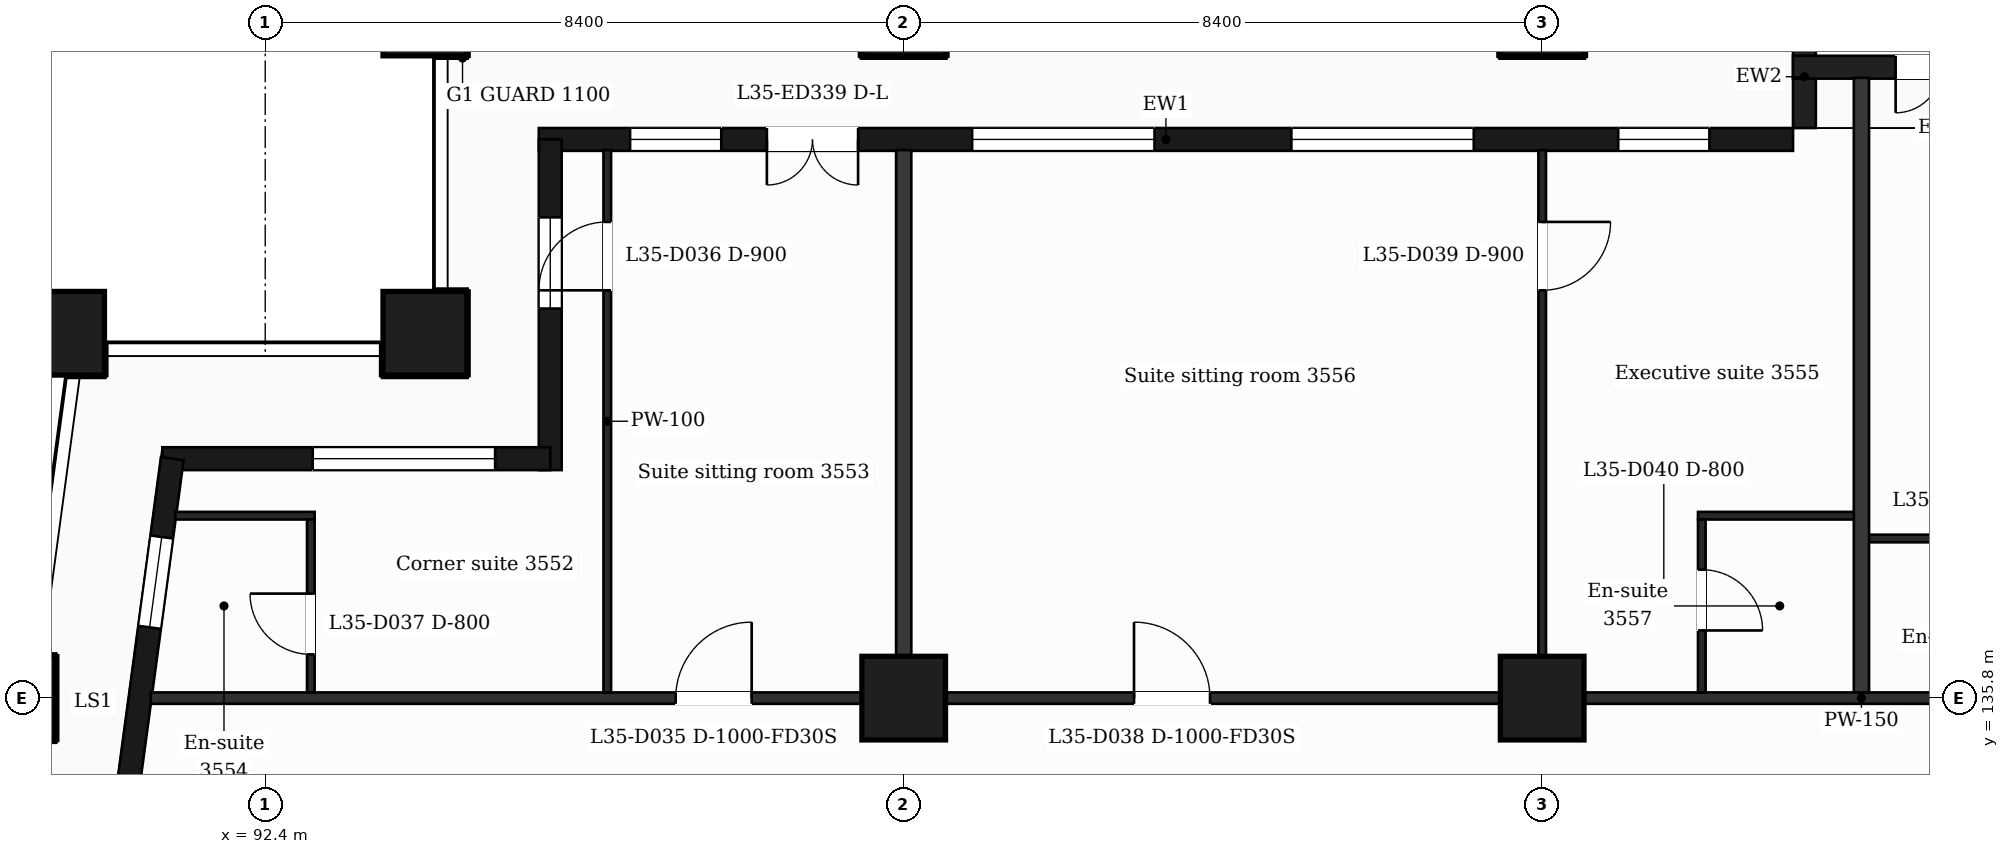
"""IFC4 building model, lengths in metres.
Left out: names, types, materials, properties, quantities, classifications, styles, units other than length and angle.
Written with IfcOpenShell. Run it as: python <this file> out.ifc"""

import sys

from ifc_helpers import new_model, si_unit, direction, frame, frame_2d, origin, origin_2d, place, context, subcontext, project, spatial, rectangle, extrude, element, fill, save


model = new_model("IFC4")
c1 = context("Model", 3, precision=1e-05, world=origin(), true_north=direction((0.0, 1.0)))
c2 = subcontext(c1, "Body", "Model", "MODEL_VIEW")
j1 = project(units=[si_unit("LENGTHUNIT", "METRE"), si_unit("PLANEANGLEUNIT", "RADIAN")], contexts=[c1])
p1 = place(None, origin())
s1 = spatial("IfcSite", under=j1, at=p1, CompositionType="ELEMENT")
p2 = place(p1, origin())
s2 = spatial("IfcBuilding", under=s1, at=p2, CompositionType="ELEMENT")
p3 = place(p2, frame((0.0, 0.0, 151.5)))
s3 = spatial("IfcBuildingStorey", under=s2, at=p3, CompositionType="ELEMENT", Elevation=151.5)
for number, where, z_axis, x_axis in (
    (1, (94.5, 140.6, 0.0), (0.0, 0.0, 1.0), (1.0, 0.0, 0.0)),
    (2, (89.735, 140.6, 0.0), (0.0, 0.0, 1.0), (1.0, 0.0, 0.0)),
    (3, (100.8, 135.8, 0.0), (0.0, 0.0, 1.0), (1.0, 0.0, 0.0)),
    (4, (109.2, 135.8, 0.0), (0.0, 0.0, 1.0), (1.0, 0.0, 0.0)),
    (5, (89.088, 135.8, 0.0), (0.0, 0.0, 1.0), (1.0, 0.0, 0.0)),
    (6, (100.8, 144.8, 0.0), (0.0, 0.0, 1.0), (1.0, 0.0, 0.0)),
    (7, (109.2, 144.8, 0.0), (0.0, 0.0, 1.0), (1.0, 0.0, 0.0)),
    (8, (94.5, 144.8, 0.0), (0.0, 0.0, 1.0), (1.0, 0.0, 0.0)),
):
    element("IfcColumn", number, at=place(p3, frame(where, z_axis=z_axis, x_axis=x_axis)), inside=s3, PredefinedType="COLUMN", context=c2, shape_type="SweptSolid", body=[
        extrude(rectangle(XDim=1.1, YDim=1.1, at=origin_2d()), origin(), (0.0, 0.0, 1.0), 3.7),
    ])
p4 = place(p3, frame((112.5, 143.15, 0.0), z_axis=(0.0, 0.0, 1.0), x_axis=(-1.0, 0.0, 0.0)))
e9 = element("IfcWall", 9, at=p4, inside=s3, PredefinedType="SOLIDWALL", context=c2, shape_type="SweptSolid", body=[
    extrude(rectangle(XDim=16.5, YDim=0.3, at=frame_2d((8.25, 0.0))), origin(), (0.0, 0.0, 1.0), 3.38),
])
p5 = place(p4, frame((1.1, 0.0, 0.9)))
e10 = element("IfcOpeningElement", 10, at=p5, cuts=e9, PredefinedType="OPENING", context=c2, shape_type="SweptSolid", body=[
    extrude(rectangle(XDim=1.2, YDim=2.1, at=frame_2d((0.6, 1.05))), frame((0.0, 0.16, 0.0), z_axis=(0.0, -1.0, 0.0), x_axis=(1.0, 0.0, 0.0)), (0.0, 0.0, 1.0), 0.32),
])
p6 = place(p4, frame((4.2, 0.0, 0.9)))
e11 = element("IfcOpeningElement", 11, at=p6, cuts=e9, PredefinedType="OPENING", context=c2, shape_type="SweptSolid", body=[
    extrude(rectangle(XDim=2.4, YDim=2.1, at=frame_2d((1.2, 1.05))), frame((0.0, 0.16, 0.0), z_axis=(0.0, -1.0, 0.0), x_axis=(1.0, 0.0, 0.0)), (0.0, 0.0, 1.0), 0.32),
])
p7 = place(p4, frame((8.4, 0.0, 0.9)))
e12 = element("IfcOpeningElement", 12, at=p7, cuts=e9, PredefinedType="OPENING", context=c2, shape_type="SweptSolid", body=[
    extrude(rectangle(XDim=2.4, YDim=2.1, at=frame_2d((1.2, 1.05))), frame((0.0, 0.16, 0.0), z_axis=(0.0, -1.0, 0.0), x_axis=(1.0, 0.0, 0.0)), (0.0, 0.0, 1.0), 0.32),
])
p8 = place(p4, frame((12.3, 0.0, 0.0)))
e13 = element("IfcOpeningElement", 13, at=p8, cuts=e9, PredefinedType="OPENING", context=c2, shape_type="SweptSolid", body=[
    extrude(rectangle(XDim=1.2, YDim=2.4, at=frame_2d((0.6, 1.2))), frame((0.0, 0.16, 0.0), z_axis=(0.0, -1.0, 0.0), x_axis=(1.0, 0.0, 0.0)), (0.0, 0.0, 1.0), 0.32),
])
p9 = place(p4, frame((14.1, 0.0, 0.9)))
e14 = element("IfcOpeningElement", 14, at=p9, cuts=e9, PredefinedType="OPENING", context=c2, shape_type="SweptSolid", body=[
    extrude(rectangle(XDim=1.2, YDim=2.1, at=frame_2d((0.6, 1.05))), frame((0.0, 0.16, 0.0), z_axis=(0.0, -1.0, 0.0), x_axis=(1.0, 0.0, 0.0)), (0.0, 0.0, 1.0), 0.32),
])
p10 = place(p3, frame((112.65, 143.3, 0.0), z_axis=(0.0, 0.0, 1.0), x_axis=(0.0, 1.0, 0.0)))
e15 = element("IfcWall", 15, at=p10, inside=s3, PredefinedType="SOLIDWALL", context=c2, shape_type="SweptSolid", body=[
    extrude(rectangle(XDim=1.35, YDim=0.3, at=frame_2d((0.675, 0.0))), origin(), (0.0, 0.0, 1.0), 3.38),
])
p11 = place(p3, frame((116.4, 144.1, 0.0), z_axis=(0.0, 0.0, 1.0), x_axis=(-1.0, 0.0, 0.0)))
e16 = element("IfcWall", 16, at=p11, inside=s3, PredefinedType="SOLIDWALL", context=c2, shape_type="SweptSolid", body=[
    extrude(rectangle(XDim=3.9, YDim=0.3, at=frame_2d((1.95, 0.0))), origin(), (0.0, 0.0, 1.0), 3.38),
])
p12 = place(p11, frame((1.35, 0.0, 0.0)))
e17 = element("IfcOpeningElement", 17, at=p12, cuts=e16, PredefinedType="OPENING", context=c2, shape_type="SweptSolid", body=[
    extrude(rectangle(XDim=1.2, YDim=2.4, at=frame_2d((0.6, 1.2))), frame((0.0, 0.16, 0.0), z_axis=(0.0, -1.0, 0.0), x_axis=(1.0, 0.0, 0.0)), (0.0, 0.0, 1.0), 0.32),
])
p13 = place(p3, frame((96.15, 143.15, 0.0), z_axis=(0.0, 0.0, 1.0), x_axis=(0.0, -1.0, 0.0)))
e18 = element("IfcWall", 18, at=p13, inside=s3, PredefinedType="SOLIDWALL", context=c2, shape_type="SweptSolid", body=[
    extrude(rectangle(XDim=4.35, YDim=0.3, at=frame_2d((2.175, 0.0))), origin(), (0.0, 0.0, 1.0), 3.38),
])
p14 = place(p13, frame((1.025, 0.0, 0.9)))
e19 = element("IfcOpeningElement", 19, at=p14, cuts=e18, PredefinedType="OPENING", context=c2, shape_type="SweptSolid", body=[
    extrude(rectangle(XDim=1.2, YDim=2.1, at=frame_2d((0.6, 1.05))), frame((0.0, 0.16, 0.0), z_axis=(0.0, -1.0, 0.0), x_axis=(1.0, 0.0, 0.0)), (0.0, 0.0, 1.0), 0.32),
])
p15 = place(p3, frame((96.15, 138.95, 0.0), z_axis=(0.0, 0.0, 1.0), x_axis=(-1.0, 0.0, 0.0)))
e20 = element("IfcWall", 20, at=p15, inside=s3, PredefinedType="SOLIDWALL", context=c2, shape_type="SweptSolid", body=[
    extrude(rectangle(XDim=5.104, YDim=0.3, at=frame_2d((2.552, 0.0))), origin(), (0.0, 0.0, 1.0), 3.38),
])
p16 = place(p15, frame((0.725, 0.0, 0.9)))
e21 = element("IfcOpeningElement", 21, at=p16, cuts=e20, PredefinedType="OPENING", context=c2, shape_type="SweptSolid", body=[
    extrude(rectangle(XDim=2.4, YDim=2.1, at=frame_2d((1.2, 1.05))), frame((0.0, 0.16, 0.0), z_axis=(0.0, -1.0, 0.0), x_axis=(1.0, 0.0, 0.0)), (0.0, 0.0, 1.0), 0.32),
])
p17 = place(p3, frame((91.177, 138.95, 0.0), z_axis=(0.0, 0.0, 1.0), x_axis=(-0.133426664613, -0.991058689065, 0.0)))
e22 = element("IfcWall", 22, at=p17, inside=s3, PredefinedType="SOLIDWALL", context=c2, shape_type="SweptSolid", body=[
    extrude(rectangle(XDim=6.609, YDim=0.3, at=frame_2d((3.305, 0.0))), origin(), (0.0, 0.0, 1.0), 3.38),
])
p18 = place(p17, frame((1.039, 0.0, 0.9)))
e23 = element("IfcOpeningElement", 23, at=p18, cuts=e22, PredefinedType="OPENING", context=c2, shape_type="SweptSolid", body=[
    extrude(rectangle(XDim=1.2, YDim=2.1, at=frame_2d((0.6, 1.05))), frame((0.0, 0.16, 0.0), z_axis=(0.0, -1.0, 0.0), x_axis=(1.0, 0.0, 0.0)), (0.0, 0.0, 1.0), 0.32),
])
p19 = place(p17, frame((4.294, 0.0, 0.0)))
e24 = element("IfcOpeningElement", 24, at=p19, cuts=e22, PredefinedType="OPENING", context=c2, shape_type="SweptSolid", body=[
    extrude(rectangle(XDim=1.2, YDim=2.4, at=frame_2d((0.6, 1.2))), frame((0.0, 0.16, 0.0), z_axis=(0.0, -1.0, 0.0), x_axis=(1.0, 0.0, 0.0)), (0.0, 0.0, 1.0), 0.32),
])
p20 = place(p3, frame((90.895, 135.8, 0.0), z_axis=(0.0, 0.0, 1.0), x_axis=(1.0, 0.0, 0.0)))
e25 = element("IfcWall", 25, at=p20, inside=s3, PredefinedType="PARTITIONING", context=c2, shape_type="SweptSolid", body=[
    extrude(rectangle(XDim=45.011, YDim=0.15, at=frame_2d((22.505, 0.0))), origin(), (0.0, 0.0, 1.0), 3.38),
])
p21 = place(p20, frame((6.906, 0.0, 0.0)))
e26 = element("IfcOpeningElement", 26, at=p21, cuts=e25, PredefinedType="OPENING", context=c2, shape_type="SweptSolid", body=[
    extrude(rectangle(XDim=1.0, YDim=2.1, at=frame_2d((0.5, 1.05))), frame((0.0, 0.085, 0.0), z_axis=(0.0, -1.0, 0.0), x_axis=(1.0, 0.0, 0.0)), (0.0, 0.0, 1.0), 0.17),
])
p22 = place(p20, frame((12.935, 0.0, 0.0)))
e27 = element("IfcOpeningElement", 27, at=p22, cuts=e25, PredefinedType="OPENING", context=c2, shape_type="SweptSolid", body=[
    extrude(rectangle(XDim=1.0, YDim=2.1, at=frame_2d((0.5, 1.05))), frame((0.0, 0.085, 0.0), z_axis=(0.0, -1.0, 0.0), x_axis=(1.0, 0.0, 0.0)), (0.0, 0.0, 1.0), 0.17),
])
p23 = place(p20, frame((27.477, 0.0, 0.0)))
e28 = element("IfcOpeningElement", 28, at=p23, cuts=e25, PredefinedType="OPENING", context=c2, shape_type="SweptSolid", body=[
    extrude(rectangle(XDim=0.95, YDim=2.1, at=frame_2d((0.475, 1.05))), frame((0.0, 0.085, 0.0), z_axis=(0.0, -1.0, 0.0), x_axis=(1.0, 0.0, 0.0)), (0.0, 0.0, 1.0), 0.17),
])
p24 = place(p20, frame((31.555, 0.0, 0.0)))
e29 = element("IfcOpeningElement", 29, at=p24, cuts=e25, PredefinedType="OPENING", context=c2, shape_type="SweptSolid", body=[
    extrude(rectangle(XDim=0.95, YDim=2.1, at=frame_2d((0.475, 1.05))), frame((0.0, 0.085, 0.0), z_axis=(0.0, -1.0, 0.0), x_axis=(1.0, 0.0, 0.0)), (0.0, 0.0, 1.0), 0.17),
])
p25 = place(p20, frame((36.555, 0.0, 0.0)))
e30 = element("IfcOpeningElement", 30, at=p25, cuts=e25, PredefinedType="OPENING", context=c2, shape_type="SweptSolid", body=[
    extrude(rectangle(XDim=1.0, YDim=2.1, at=frame_2d((0.5, 1.05))), frame((0.0, 0.085, 0.0), z_axis=(0.0, -1.0, 0.0), x_axis=(1.0, 0.0, 0.0)), (0.0, 0.0, 1.0), 0.17),
])
p26 = place(p3, frame((113.4, 137.9, 0.0), z_axis=(0.0, 0.0, 1.0), x_axis=(1.0, 0.0, 0.0)))
e31 = element("IfcWall", 31, at=p26, inside=s3, PredefinedType="PARTITIONING", context=c2, shape_type="SweptSolid", body=[
    extrude(rectangle(XDim=2.75, YDim=0.1, at=frame_2d((1.375, 0.0))), origin(), (0.0, 0.0, 1.0), 3.38),
])
p27 = place(p26, frame((1.07, 0.0, 0.0)))
e32 = element("IfcOpeningElement", 32, at=p27, cuts=e31, PredefinedType="OPENING", context=c2, shape_type="SweptSolid", body=[
    extrude(rectangle(XDim=0.8, YDim=2.1, at=frame_2d((0.4, 1.05))), frame((0.0, 0.06, 0.0), z_axis=(0.0, -1.0, 0.0), x_axis=(1.0, 0.0, 0.0)), (0.0, 0.0, 1.0), 0.12),
])
p28 = place(p3, frame((91.218, 138.2, 0.0), z_axis=(0.0, 0.0, 1.0), x_axis=(1.0, 0.0, 0.0)))
e33 = element("IfcWall", 33, at=p28, inside=s3, PredefinedType="PARTITIONING", context=c2, shape_type="SweptSolid", body=[
    extrude(rectangle(XDim=1.832, YDim=0.1, at=frame_2d((0.916, 0.0))), origin(), (0.0, 0.0, 1.0), 3.38),
])
p29 = place(p3, frame((111.25, 138.2, 0.0), z_axis=(0.0, 0.0, 1.0), x_axis=(1.0, 0.0, 0.0)))
e34 = element("IfcWall", 34, at=p29, inside=s3, PredefinedType="PARTITIONING", context=c2, shape_type="SweptSolid", body=[
    extrude(rectangle(XDim=2.15, YDim=0.1, at=frame_2d((1.075, 0.0))), origin(), (0.0, 0.0, 1.0), 3.38),
])
p30 = place(p3, frame((93.0, 135.875, 0.0), z_axis=(0.0, 0.0, 1.0), x_axis=(0.0, 1.0, 0.0)))
e35 = element("IfcWall", 35, at=p30, inside=s3, PredefinedType="PARTITIONING", context=c2, shape_type="SweptSolid", body=[
    extrude(rectangle(XDim=2.275, YDim=0.1, at=frame_2d((1.137, 0.0))), origin(), (0.0, 0.0, 1.0), 3.38),
])
p31 = place(p30, frame((0.5, 0.0, 0.0)))
e36 = element("IfcOpeningElement", 36, at=p31, cuts=e35, PredefinedType="OPENING", context=c2, shape_type="SweptSolid", body=[
    extrude(rectangle(XDim=0.8, YDim=2.1, at=frame_2d((0.4, 1.05))), frame((0.0, 0.06, 0.0), z_axis=(0.0, -1.0, 0.0), x_axis=(1.0, 0.0, 0.0)), (0.0, 0.0, 1.0), 0.12),
])
p32 = place(p3, frame((96.9, 135.875, 0.0), z_axis=(0.0, 0.0, 1.0), x_axis=(0.0, 1.0, 0.0)))
e37 = element("IfcWall", 37, at=p32, inside=s3, PredefinedType="PARTITIONING", context=c2, shape_type="SweptSolid", body=[
    extrude(rectangle(XDim=7.135, YDim=0.1, at=frame_2d((3.567, 0.0))), origin(), (0.0, 0.0, 1.0), 3.38),
])
p33 = place(p32, frame((5.29, 0.0, 0.0)))
e38 = element("IfcOpeningElement", 38, at=p33, cuts=e37, PredefinedType="OPENING", context=c2, shape_type="SweptSolid", body=[
    extrude(rectangle(XDim=0.9, YDim=2.1, at=frame_2d((0.45, 1.05))), frame((0.0, 0.06, 0.0), z_axis=(0.0, -1.0, 0.0), x_axis=(1.0, 0.0, 0.0)), (0.0, 0.0, 1.0), 0.12),
])
p34 = place(p3, frame((100.8, 135.875, 0.0), z_axis=(0.0, 0.0, 1.0), x_axis=(0.0, 1.0, 0.0)))
e39 = element("IfcWall", 39, at=p34, inside=s3, PredefinedType="PARTITIONING", context=c2, shape_type="SweptSolid", body=[
    extrude(rectangle(XDim=7.135, YDim=0.2, at=frame_2d((3.567, 0.0))), origin(), (0.0, 0.0, 1.0), 3.38),
])
p35 = place(p3, frame((109.2, 135.875, 0.0), z_axis=(0.0, 0.0, 1.0), x_axis=(0.0, 1.0, 0.0)))
e40 = element("IfcWall", 40, at=p35, inside=s3, PredefinedType="PARTITIONING", context=c2, shape_type="SweptSolid", body=[
    extrude(rectangle(XDim=7.135, YDim=0.1, at=frame_2d((3.567, 0.0))), origin(), (0.0, 0.0, 1.0), 3.38),
])
p36 = place(p35, frame((5.29, 0.0, 0.0)))
e41 = element("IfcOpeningElement", 41, at=p36, cuts=e40, PredefinedType="OPENING", context=c2, shape_type="SweptSolid", body=[
    extrude(rectangle(XDim=0.9, YDim=2.1, at=frame_2d((0.45, 1.05))), frame((0.0, 0.06, 0.0), z_axis=(0.0, -1.0, 0.0), x_axis=(1.0, 0.0, 0.0)), (0.0, 0.0, 1.0), 0.12),
])
p37 = place(p3, frame((111.3, 135.875, 0.0), z_axis=(0.0, 0.0, 1.0), x_axis=(0.0, 1.0, 0.0)))
e42 = element("IfcWall", 42, at=p37, inside=s3, PredefinedType="PARTITIONING", context=c2, shape_type="SweptSolid", body=[
    extrude(rectangle(XDim=2.275, YDim=0.1, at=frame_2d((1.137, 0.0))), origin(), (0.0, 0.0, 1.0), 3.38),
])
p38 = place(p37, frame((0.815, 0.0, 0.0)))
e43 = element("IfcOpeningElement", 43, at=p38, cuts=e42, PredefinedType="OPENING", context=c2, shape_type="SweptSolid", body=[
    extrude(rectangle(XDim=0.8, YDim=2.1, at=frame_2d((0.4, 1.05))), frame((0.0, 0.06, 0.0), z_axis=(0.0, -1.0, 0.0), x_axis=(1.0, 0.0, 0.0)), (0.0, 0.0, 1.0), 0.12),
])
p39 = place(p3, frame((113.4, 135.875, 0.0), z_axis=(0.0, 0.0, 1.0), x_axis=(0.0, 1.0, 0.0)))
e44 = element("IfcWall", 44, at=p39, inside=s3, PredefinedType="PARTITIONING", context=c2, shape_type="SweptSolid", body=[
    extrude(rectangle(XDim=8.085, YDim=0.2, at=frame_2d((4.042, 0.0))), origin(), (0.0, 0.0, 1.0), 3.38),
])
p40 = place(p5, origin())
e45 = element("IfcWindow", 45, at=p40, inside=s3, PartitioningType="SINGLE_PANEL", PredefinedType="WINDOW", context=c2, shape_type="SweptSolid", body=[
    extrude(rectangle(XDim=1.2, YDim=2.1, at=frame_2d((0.6, 1.05))), frame((0.0, 0.03, 0.0), z_axis=(0.0, -1.0, 0.0), x_axis=(1.0, 0.0, 0.0)), (0.0, 0.0, 1.0), 0.06),
])
fill(e10, e45)
p41 = place(p6, origin())
e46 = element("IfcWindow", 46, at=p41, inside=s3, PartitioningType="SINGLE_PANEL", PredefinedType="WINDOW", context=c2, shape_type="SweptSolid", body=[
    extrude(rectangle(XDim=2.4, YDim=2.1, at=frame_2d((1.2, 1.05))), frame((0.0, 0.03, 0.0), z_axis=(0.0, -1.0, 0.0), x_axis=(1.0, 0.0, 0.0)), (0.0, 0.0, 1.0), 0.06),
])
fill(e11, e46)
p42 = place(p7, origin())
e47 = element("IfcWindow", 47, at=p42, inside=s3, PartitioningType="SINGLE_PANEL", PredefinedType="WINDOW", context=c2, shape_type="SweptSolid", body=[
    extrude(rectangle(XDim=2.4, YDim=2.1, at=frame_2d((1.2, 1.05))), frame((0.0, 0.03, 0.0), z_axis=(0.0, -1.0, 0.0), x_axis=(1.0, 0.0, 0.0)), (0.0, 0.0, 1.0), 0.06),
])
fill(e12, e47)
p43 = place(p8, origin())
e48 = element("IfcDoor", 48, at=p43, inside=s3, OperationType="DOUBLE_DOOR_SINGLE_SWING", PredefinedType="DOOR", context=c2, shape_type="SweptSolid", body=[
    extrude(rectangle(XDim=1.2, YDim=2.4, at=frame_2d((0.6, 1.2))), frame((0.0, 0.025, 0.0), z_axis=(0.0, -1.0, 0.0), x_axis=(1.0, 0.0, 0.0)), (0.0, 0.0, 1.0), 0.05),
])
fill(e13, e48)
p44 = place(p9, origin())
e49 = element("IfcWindow", 49, at=p44, inside=s3, PartitioningType="SINGLE_PANEL", PredefinedType="WINDOW", context=c2, shape_type="SweptSolid", body=[
    extrude(rectangle(XDim=1.2, YDim=2.1, at=frame_2d((0.6, 1.05))), frame((0.0, 0.03, 0.0), z_axis=(0.0, -1.0, 0.0), x_axis=(1.0, 0.0, 0.0)), (0.0, 0.0, 1.0), 0.06),
])
fill(e14, e49)
p45 = place(p12, origin())
e50 = element("IfcDoor", 50, at=p45, inside=s3, OperationType="DOUBLE_DOOR_SINGLE_SWING", PredefinedType="DOOR", context=c2, shape_type="SweptSolid", body=[
    extrude(rectangle(XDim=1.2, YDim=2.4, at=frame_2d((0.6, 1.2))), frame((0.0, 0.025, 0.0), z_axis=(0.0, -1.0, 0.0), x_axis=(1.0, 0.0, 0.0)), (0.0, 0.0, 1.0), 0.05),
])
fill(e17, e50)
p46 = place(p14, origin())
e51 = element("IfcWindow", 51, at=p46, inside=s3, PartitioningType="SINGLE_PANEL", PredefinedType="WINDOW", context=c2, shape_type="SweptSolid", body=[
    extrude(rectangle(XDim=1.2, YDim=2.1, at=frame_2d((0.6, 1.05))), frame((0.0, 0.03, 0.0), z_axis=(0.0, -1.0, 0.0), x_axis=(1.0, 0.0, 0.0)), (0.0, 0.0, 1.0), 0.06),
])
fill(e19, e51)
p47 = place(p16, origin())
e52 = element("IfcWindow", 52, at=p47, inside=s3, PartitioningType="SINGLE_PANEL", PredefinedType="WINDOW", context=c2, shape_type="SweptSolid", body=[
    extrude(rectangle(XDim=2.4, YDim=2.1, at=frame_2d((1.2, 1.05))), frame((0.0, 0.03, 0.0), z_axis=(0.0, -1.0, 0.0), x_axis=(1.0, 0.0, 0.0)), (0.0, 0.0, 1.0), 0.06),
])
fill(e21, e52)
p48 = place(p18, origin())
e53 = element("IfcWindow", 53, at=p48, inside=s3, PartitioningType="SINGLE_PANEL", PredefinedType="WINDOW", context=c2, shape_type="SweptSolid", body=[
    extrude(rectangle(XDim=1.2, YDim=2.1, at=frame_2d((0.6, 1.05))), frame((0.0, 0.03, 0.0), z_axis=(0.0, -1.0, 0.0), x_axis=(1.0, 0.0, 0.0)), (0.0, 0.0, 1.0), 0.06),
])
fill(e23, e53)
p49 = place(p21, origin())
e54 = element("IfcDoor", 54, at=p49, inside=s3, OperationType="SINGLE_SWING_RIGHT", PredefinedType="DOOR", context=c2, shape_type="SweptSolid", body=[
    extrude(rectangle(XDim=1.0, YDim=2.1, at=frame_2d((0.5, 1.05))), frame((0.0, 0.025, 0.0), z_axis=(0.0, -1.0, 0.0), x_axis=(1.0, 0.0, 0.0)), (0.0, 0.0, 1.0), 0.05),
])
fill(e26, e54)
p50 = place(p33, origin())
e55 = element("IfcDoor", 55, at=p50, inside=s3, OperationType="SINGLE_SWING_LEFT", PredefinedType="DOOR", context=c2, shape_type="SweptSolid", body=[
    extrude(rectangle(XDim=0.9, YDim=2.1, at=frame_2d((0.45, 1.05))), frame((0.0, 0.025, 0.0), z_axis=(0.0, -1.0, 0.0), x_axis=(1.0, 0.0, 0.0)), (0.0, 0.0, 1.0), 0.05),
])
fill(e38, e55)
p51 = place(p31, origin())
e56 = element("IfcDoor", 56, at=p51, inside=s3, OperationType="SINGLE_SWING_RIGHT", PredefinedType="DOOR", context=c2, shape_type="SweptSolid", body=[
    extrude(rectangle(XDim=0.8, YDim=2.1, at=frame_2d((0.4, 1.05))), frame((0.0, 0.025, 0.0), z_axis=(0.0, -1.0, 0.0), x_axis=(1.0, 0.0, 0.0)), (0.0, 0.0, 1.0), 0.05),
])
fill(e36, e56)
p52 = place(p22, origin())
e57 = element("IfcDoor", 57, at=p52, inside=s3, OperationType="SINGLE_SWING_LEFT", PredefinedType="DOOR", context=c2, shape_type="SweptSolid", body=[
    extrude(rectangle(XDim=1.0, YDim=2.1, at=frame_2d((0.5, 1.05))), frame((0.0, 0.025, 0.0), z_axis=(0.0, -1.0, 0.0), x_axis=(1.0, 0.0, 0.0)), (0.0, 0.0, 1.0), 0.05),
])
fill(e27, e57)
p53 = place(p36, origin())
e58 = element("IfcDoor", 58, at=p53, inside=s3, OperationType="SINGLE_SWING_RIGHT", PredefinedType="DOOR", context=c2, shape_type="SweptSolid", body=[
    extrude(rectangle(XDim=0.9, YDim=2.1, at=frame_2d((0.45, 1.05))), frame((0.0, 0.025, 0.0), z_axis=(0.0, -1.0, 0.0), x_axis=(1.0, 0.0, 0.0)), (0.0, 0.0, 1.0), 0.05),
])
fill(e41, e58)
p54 = place(p38, origin())
e59 = element("IfcDoor", 59, at=p54, inside=s3, OperationType="SINGLE_SWING_LEFT", PredefinedType="DOOR", context=c2, shape_type="SweptSolid", body=[
    extrude(rectangle(XDim=0.8, YDim=2.1, at=frame_2d((0.4, 1.05))), frame((0.0, 0.025, 0.0), z_axis=(0.0, -1.0, 0.0), x_axis=(1.0, 0.0, 0.0)), (0.0, 0.0, 1.0), 0.05),
])
fill(e43, e59)
save(model, sys.argv[1])
